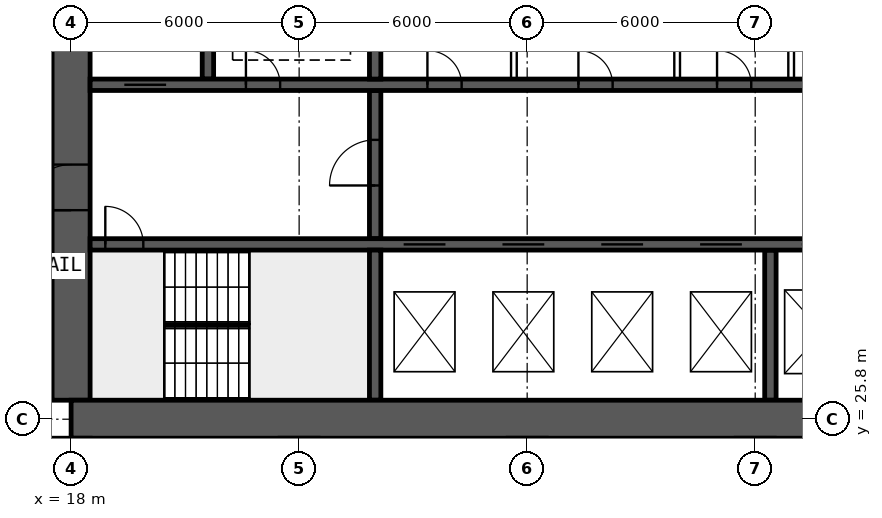
"""IFC4 building model, lengths in metres.
Left out: names, types, materials, properties, quantities, classifications, styles, units other than length and angle.
Written with IfcOpenShell. Run it as: python <this file> out.ifc"""

import sys

from ifc_helpers import new_model, si_unit, direction, frame, frame_2d, origin, place, context, subcontext, project, spatial, rectangle, extrude, element, fill, save


model = new_model("IFC4")
c1 = context("Model", 3, precision=1e-05, world=origin(), true_north=direction((0.0, 1.0)))
c2 = subcontext(c1, "Body", "Model", "MODEL_VIEW")
j1 = project(units=[si_unit("LENGTHUNIT", "METRE"), si_unit("PLANEANGLEUNIT", "RADIAN")], contexts=[c1])
p1 = place(None, origin())
s1 = spatial("IfcSite", under=j1, at=p1, CompositionType="ELEMENT")
p2 = place(p1, origin())
s2 = spatial("IfcBuilding", under=s1, at=p2, CompositionType="ELEMENT")
p3 = place(p2, origin())
s3 = spatial("IfcBuildingStorey", under=s2, at=p3, CompositionType="ELEMENT", Elevation=0.0)
p4 = place(p3, frame((18.0, 25.8, 0.0), z_axis=(0.0, 0.0, 1.0), x_axis=(1.0, 0.0, 0.0)))
e1 = element("IfcWall", 1, at=p4, inside=s3, PredefinedType="SHEAR", context=c2, shape_type="SweptSolid", body=[
    extrude(rectangle(XDim=48.0, YDim=1.0, at=frame_2d((24.0, 0.0))), origin(), (0.0, 0.0, 1.0), 6.0),
])
p5 = place(p3, frame((18.0, 26.3, 0.0), z_axis=(0.0, 0.0, 1.0), x_axis=(0.0, 1.0, 0.0)))
e2 = element("IfcWall", 2, at=p5, inside=s3, PredefinedType="SHEAR", context=c2, shape_type="SweptSolid", body=[
    extrude(rectangle(XDim=11.4, YDim=1.0, at=frame_2d((5.7, 0.0))), origin(), (0.0, 0.0, 1.0), 6.0),
])
p6 = place(p5, frame((5.0, 0.0, 0.0)))
e3 = element("IfcOpeningElement", 3, at=p6, cuts=e2, PredefinedType="OPENING", context=c2, shape_type="SweptSolid", body=[
    extrude(rectangle(XDim=1.2, YDim=2.1, at=frame_2d((0.6, 1.05))), frame((0.0, 0.51, 0.0), z_axis=(0.0, -1.0, 0.0), x_axis=(1.0, 0.0, 0.0)), (0.0, 0.0, 1.0), 1.02),
])
p7 = place(p3, frame((18.5, 30.4, 0.0), z_axis=(0.0, 0.0, 1.0), x_axis=(1.0, 0.0, 0.0)))
e4 = element("IfcWall", 4, at=p7, inside=s3, PredefinedType="SHEAR", context=c2, shape_type="SweptSolid", body=[
    extrude(rectangle(XDim=47.0, YDim=0.3, at=frame_2d((23.5, 0.0))), origin(), (0.0, 0.0, 1.0), 6.0),
])
p8 = place(p7, frame((0.4, 0.0, 0.0)))
e5 = element("IfcOpeningElement", 5, at=p8, cuts=e4, PredefinedType="OPENING", context=c2, shape_type="SweptSolid", body=[
    extrude(rectangle(XDim=1.0, YDim=2.1, at=frame_2d((0.5, 1.05))), frame((0.0, 0.16, 0.0), z_axis=(0.0, -1.0, 0.0), x_axis=(1.0, 0.0, 0.0)), (0.0, 0.0, 1.0), 0.32),
])
p9 = place(p7, frame((45.6, 0.0, 0.0)))
e6 = element("IfcOpeningElement", 6, at=p9, cuts=e4, PredefinedType="OPENING", context=c2, shape_type="SweptSolid", body=[
    extrude(rectangle(XDim=1.0, YDim=2.1, at=frame_2d((0.5, 1.05))), frame((0.0, 0.16, 0.0), z_axis=(0.0, -1.0, 0.0), x_axis=(1.0, 0.0, 0.0)), (0.0, 0.0, 1.0), 0.32),
])
p10 = place(p7, frame((8.25, 0.0, 0.0)))
e7 = element("IfcOpeningElement", 7, at=p10, cuts=e4, PredefinedType="OPENING", context=c2, shape_type="SweptSolid", body=[
    extrude(rectangle(XDim=1.1, YDim=2.1, at=frame_2d((0.55, 1.05))), frame((0.0, 0.16, 0.0), z_axis=(0.0, -1.0, 0.0), x_axis=(1.0, 0.0, 0.0)), (0.0, 0.0, 1.0), 0.32),
])
p11 = place(p7, frame((10.85, 0.0, 0.0)))
e8 = element("IfcOpeningElement", 8, at=p11, cuts=e4, PredefinedType="OPENING", context=c2, shape_type="SweptSolid", body=[
    extrude(rectangle(XDim=1.1, YDim=2.1, at=frame_2d((0.55, 1.05))), frame((0.0, 0.16, 0.0), z_axis=(0.0, -1.0, 0.0), x_axis=(1.0, 0.0, 0.0)), (0.0, 0.0, 1.0), 0.32),
])
p12 = place(p7, frame((13.45, 0.0, 0.0)))
e9 = element("IfcOpeningElement", 9, at=p12, cuts=e4, PredefinedType="OPENING", context=c2, shape_type="SweptSolid", body=[
    extrude(rectangle(XDim=1.1, YDim=2.1, at=frame_2d((0.55, 1.05))), frame((0.0, 0.16, 0.0), z_axis=(0.0, -1.0, 0.0), x_axis=(1.0, 0.0, 0.0)), (0.0, 0.0, 1.0), 0.32),
])
p13 = place(p7, frame((16.05, 0.0, 0.0)))
e10 = element("IfcOpeningElement", 10, at=p13, cuts=e4, PredefinedType="OPENING", context=c2, shape_type="SweptSolid", body=[
    extrude(rectangle(XDim=1.1, YDim=2.1, at=frame_2d((0.55, 1.05))), frame((0.0, 0.16, 0.0), z_axis=(0.0, -1.0, 0.0), x_axis=(1.0, 0.0, 0.0)), (0.0, 0.0, 1.0), 0.32),
])
p14 = place(p7, frame((18.725, 0.0, 0.0)))
e11 = element("IfcOpeningElement", 11, at=p14, cuts=e4, PredefinedType="OPENING", context=c2, shape_type="SweptSolid", body=[
    extrude(rectangle(XDim=1.1, YDim=2.1, at=frame_2d((0.55, 1.05))), frame((0.0, 0.16, 0.0), z_axis=(0.0, -1.0, 0.0), x_axis=(1.0, 0.0, 0.0)), (0.0, 0.0, 1.0), 0.32),
])
p15 = place(p7, frame((21.475, 0.0, 0.0)))
e12 = element("IfcOpeningElement", 12, at=p15, cuts=e4, PredefinedType="OPENING", context=c2, shape_type="SweptSolid", body=[
    extrude(rectangle(XDim=1.1, YDim=2.1, at=frame_2d((0.55, 1.05))), frame((0.0, 0.16, 0.0), z_axis=(0.0, -1.0, 0.0), x_axis=(1.0, 0.0, 0.0)), (0.0, 0.0, 1.0), 0.32),
])
p16 = place(p7, frame((24.225, 0.0, 0.0)))
e13 = element("IfcOpeningElement", 13, at=p16, cuts=e4, PredefinedType="OPENING", context=c2, shape_type="SweptSolid", body=[
    extrude(rectangle(XDim=1.1, YDim=2.1, at=frame_2d((0.55, 1.05))), frame((0.0, 0.16, 0.0), z_axis=(0.0, -1.0, 0.0), x_axis=(1.0, 0.0, 0.0)), (0.0, 0.0, 1.0), 0.32),
])
p17 = place(p7, frame((26.975, 0.0, 0.0)))
e14 = element("IfcOpeningElement", 14, at=p17, cuts=e4, PredefinedType="OPENING", context=c2, shape_type="SweptSolid", body=[
    extrude(rectangle(XDim=1.1, YDim=2.1, at=frame_2d((0.55, 1.05))), frame((0.0, 0.16, 0.0), z_axis=(0.0, -1.0, 0.0), x_axis=(1.0, 0.0, 0.0)), (0.0, 0.0, 1.0), 0.32),
])
p18 = place(p7, frame((30.117, 0.0, 0.0)))
e15 = element("IfcOpeningElement", 15, at=p18, cuts=e4, PredefinedType="OPENING", context=c2, shape_type="SweptSolid", body=[
    extrude(rectangle(XDim=1.1, YDim=2.1, at=frame_2d((0.55, 1.05))), frame((0.0, 0.16, 0.0), z_axis=(0.0, -1.0, 0.0), x_axis=(1.0, 0.0, 0.0)), (0.0, 0.0, 1.0), 0.32),
])
p19 = place(p7, frame((33.65, 0.0, 0.0)))
e16 = element("IfcOpeningElement", 16, at=p19, cuts=e4, PredefinedType="OPENING", context=c2, shape_type="SweptSolid", body=[
    extrude(rectangle(XDim=1.1, YDim=2.1, at=frame_2d((0.55, 1.05))), frame((0.0, 0.16, 0.0), z_axis=(0.0, -1.0, 0.0), x_axis=(1.0, 0.0, 0.0)), (0.0, 0.0, 1.0), 0.32),
])
p20 = place(p7, frame((37.183, 0.0, 0.0)))
e17 = element("IfcOpeningElement", 17, at=p20, cuts=e4, PredefinedType="OPENING", context=c2, shape_type="SweptSolid", body=[
    extrude(rectangle(XDim=1.1, YDim=2.1, at=frame_2d((0.55, 1.05))), frame((0.0, 0.16, 0.0), z_axis=(0.0, -1.0, 0.0), x_axis=(1.0, 0.0, 0.0)), (0.0, 0.0, 1.0), 0.32),
])
p21 = place(p3, frame((18.5, 34.6, 0.0), z_axis=(0.0, 0.0, 1.0), x_axis=(1.0, 0.0, 0.0)))
e18 = element("IfcWall", 18, at=p21, inside=s3, PredefinedType="SHEAR", context=c2, shape_type="SweptSolid", body=[
    extrude(rectangle(XDim=47.0, YDim=0.3, at=frame_2d((23.5, 0.0))), origin(), (0.0, 0.0, 1.0), 6.0),
])
p22 = place(p21, frame((0.9, 0.0, 0.0)))
e19 = element("IfcOpeningElement", 19, at=p22, cuts=e18, PredefinedType="OPENING", context=c2, shape_type="SweptSolid", body=[
    extrude(rectangle(XDim=1.1, YDim=2.1, at=frame_2d((0.55, 1.05))), frame((0.0, 0.16, 0.0), z_axis=(0.0, -1.0, 0.0), x_axis=(1.0, 0.0, 0.0)), (0.0, 0.0, 1.0), 0.32),
])
p23 = place(p21, frame((45.0, 0.0, 0.0)))
e20 = element("IfcOpeningElement", 20, at=p23, cuts=e18, PredefinedType="OPENING", context=c2, shape_type="SweptSolid", body=[
    extrude(rectangle(XDim=1.1, YDim=2.1, at=frame_2d((0.55, 1.05))), frame((0.0, 0.16, 0.0), z_axis=(0.0, -1.0, 0.0), x_axis=(1.0, 0.0, 0.0)), (0.0, 0.0, 1.0), 0.32),
])
p24 = place(p21, frame((4.1, 0.0, 0.0)))
e21 = element("IfcOpeningElement", 21, at=p24, cuts=e18, PredefinedType="OPENING", context=c2, shape_type="SweptSolid", body=[
    extrude(rectangle(XDim=0.9, YDim=2.1, at=frame_2d((0.45, 1.05))), frame((0.0, 0.16, 0.0), z_axis=(0.0, -1.0, 0.0), x_axis=(1.0, 0.0, 0.0)), (0.0, 0.0, 1.0), 0.32),
])
p25 = place(p21, frame((42.0, 0.0, 0.0)))
e22 = element("IfcOpeningElement", 22, at=p25, cuts=e18, PredefinedType="OPENING", context=c2, shape_type="SweptSolid", body=[
    extrude(rectangle(XDim=0.9, YDim=2.1, at=frame_2d((0.45, 1.05))), frame((0.0, 0.16, 0.0), z_axis=(0.0, -1.0, 0.0), x_axis=(1.0, 0.0, 0.0)), (0.0, 0.0, 1.0), 0.32),
])
p26 = place(p21, frame((8.875, 0.0, 0.0)))
e23 = element("IfcOpeningElement", 23, at=p26, cuts=e18, PredefinedType="OPENING", context=c2, shape_type="SweptSolid", body=[
    extrude(rectangle(XDim=0.9, YDim=2.1, at=frame_2d((0.45, 1.05))), frame((0.0, 0.16, 0.0), z_axis=(0.0, -1.0, 0.0), x_axis=(1.0, 0.0, 0.0)), (0.0, 0.0, 1.0), 0.32),
])
p27 = place(p21, frame((12.849, 0.0, 0.0)))
e24 = element("IfcOpeningElement", 24, at=p27, cuts=e18, PredefinedType="OPENING", context=c2, shape_type="SweptSolid", body=[
    extrude(rectangle(XDim=0.9, YDim=2.1, at=frame_2d((0.45, 1.05))), frame((0.0, 0.16, 0.0), z_axis=(0.0, -1.0, 0.0), x_axis=(1.0, 0.0, 0.0)), (0.0, 0.0, 1.0), 0.32),
])
p28 = place(p21, frame((16.496, 0.0, 0.0)))
e25 = element("IfcOpeningElement", 25, at=p28, cuts=e18, PredefinedType="OPENING", context=c2, shape_type="SweptSolid", body=[
    extrude(rectangle(XDim=0.9, YDim=2.1, at=frame_2d((0.45, 1.05))), frame((0.0, 0.16, 0.0), z_axis=(0.0, -1.0, 0.0), x_axis=(1.0, 0.0, 0.0)), (0.0, 0.0, 1.0), 0.32),
])
p29 = place(p21, frame((20.255, 0.0, 0.0)))
e26 = element("IfcOpeningElement", 26, at=p29, cuts=e18, PredefinedType="OPENING", context=c2, shape_type="SweptSolid", body=[
    extrude(rectangle(XDim=0.9, YDim=2.1, at=frame_2d((0.45, 1.05))), frame((0.0, 0.16, 0.0), z_axis=(0.0, -1.0, 0.0), x_axis=(1.0, 0.0, 0.0)), (0.0, 0.0, 1.0), 0.32),
])
p30 = place(p21, frame((24.661, 0.0, 0.0)))
e27 = element("IfcOpeningElement", 27, at=p30, cuts=e18, PredefinedType="OPENING", context=c2, shape_type="SweptSolid", body=[
    extrude(rectangle(XDim=0.9, YDim=2.1, at=frame_2d((0.45, 1.05))), frame((0.0, 0.16, 0.0), z_axis=(0.0, -1.0, 0.0), x_axis=(1.0, 0.0, 0.0)), (0.0, 0.0, 1.0), 0.32),
])
p31 = place(p21, frame((27.458, 0.0, 0.0)))
e28 = element("IfcOpeningElement", 28, at=p31, cuts=e18, PredefinedType="OPENING", context=c2, shape_type="SweptSolid", body=[
    extrude(rectangle(XDim=0.9, YDim=2.1, at=frame_2d((0.45, 1.05))), frame((0.0, 0.16, 0.0), z_axis=(0.0, -1.0, 0.0), x_axis=(1.0, 0.0, 0.0)), (0.0, 0.0, 1.0), 0.32),
])
p32 = place(p21, frame((29.628, 0.0, 0.0)))
e29 = element("IfcOpeningElement", 29, at=p32, cuts=e18, PredefinedType="OPENING", context=c2, shape_type="SweptSolid", body=[
    extrude(rectangle(XDim=0.9, YDim=2.1, at=frame_2d((0.45, 1.05))), frame((0.0, 0.16, 0.0), z_axis=(0.0, -1.0, 0.0), x_axis=(1.0, 0.0, 0.0)), (0.0, 0.0, 1.0), 0.32),
])
p33 = place(p21, frame((33.427, 0.0, 0.0)))
e30 = element("IfcOpeningElement", 30, at=p33, cuts=e18, PredefinedType="OPENING", context=c2, shape_type="SweptSolid", body=[
    extrude(rectangle(XDim=0.9, YDim=2.1, at=frame_2d((0.45, 1.05))), frame((0.0, 0.16, 0.0), z_axis=(0.0, -1.0, 0.0), x_axis=(1.0, 0.0, 0.0)), (0.0, 0.0, 1.0), 0.32),
])
p34 = place(p21, frame((37.378, 0.0, 0.0)))
e31 = element("IfcOpeningElement", 31, at=p34, cuts=e18, PredefinedType="OPENING", context=c2, shape_type="SweptSolid", body=[
    extrude(rectangle(XDim=0.9, YDim=2.1, at=frame_2d((0.45, 1.05))), frame((0.0, 0.16, 0.0), z_axis=(0.0, -1.0, 0.0), x_axis=(1.0, 0.0, 0.0)), (0.0, 0.0, 1.0), 0.32),
])
p35 = place(p3, frame((26.0, 26.3, 0.0), z_axis=(0.0, 0.0, 1.0), x_axis=(0.0, 1.0, 0.0)))
e32 = element("IfcWall", 32, at=p35, inside=s3, PredefinedType="SHEAR", context=c2, shape_type="SweptSolid", body=[
    extrude(rectangle(XDim=3.95, YDim=0.3, at=frame_2d((1.975, 0.0))), origin(), (0.0, 0.0, 1.0), 6.0),
])
p36 = place(p3, frame((26.0, 30.55, 0.0), z_axis=(0.0, 0.0, 1.0), x_axis=(0.0, 1.0, 0.0)))
e33 = element("IfcWall", 33, at=p36, inside=s3, PredefinedType="SHEAR", context=c2, shape_type="SweptSolid", body=[
    extrude(rectangle(XDim=3.9, YDim=0.3, at=frame_2d((1.95, 0.0))), origin(), (0.0, 0.0, 1.0), 6.0),
])
p37 = place(p36, frame((1.4, 0.0, 0.0)))
e34 = element("IfcOpeningElement", 34, at=p37, cuts=e33, PredefinedType="OPENING", context=c2, shape_type="SweptSolid", body=[
    extrude(rectangle(XDim=1.2, YDim=2.1, at=frame_2d((0.6, 1.05))), frame((0.0, 0.16, 0.0), z_axis=(0.0, -1.0, 0.0), x_axis=(1.0, 0.0, 0.0)), (0.0, 0.0, 1.0), 0.32),
])
for number, where, z_axis, x_axis in (
    (35, (21.6, 34.75, 0.0), (0.0, 0.0, 1.0), (0.0, 1.0, 0.0)),
    (36, (26.0, 34.75, 0.0), (0.0, 0.0, 1.0), (0.0, 1.0, 0.0)),
):
    element("IfcWall", number, at=place(p3, frame(where, z_axis=z_axis, x_axis=x_axis)), inside=s3, PredefinedType="SHEAR", context=c2, shape_type="SweptSolid", body=[
        extrude(rectangle(XDim=2.95, YDim=0.3, at=frame_2d((1.475, 0.0))), origin(), (0.0, 0.0, 1.0), 6.0),
    ])
p38 = place(p3, frame((36.4, 26.3, 0.0), z_axis=(0.0, 0.0, 1.0), x_axis=(0.0, 1.0, 0.0)))
e37 = element("IfcWall", 37, at=p38, inside=s3, PredefinedType="SHEAR", context=c2, shape_type="SweptSolid", body=[
    extrude(rectangle(XDim=3.95, YDim=0.3, at=frame_2d((1.975, 0.0))), origin(), (0.0, 0.0, 1.0), 6.0),
])
for number, where, z_axis, x_axis in (
    (38, (29.651, 34.75, 0.0), (0.0, 0.0, 1.0), (0.0, 1.0, 0.0)),
    (39, (33.946, 34.75, 0.0), (0.0, 0.0, 1.0), (0.0, 1.0, 0.0)),
    (40, (36.946, 34.75, 0.0), (0.0, 0.0, 1.0), (0.0, 1.0, 0.0)),
):
    element("IfcWall", number, at=place(p3, frame(where, z_axis=z_axis, x_axis=x_axis)), inside=s3, PredefinedType="SOLIDWALL", context=c2, shape_type="SweptSolid", body=[
        extrude(rectangle(XDim=2.95, YDim=0.15, at=frame_2d((1.475, 0.0))), origin(), (0.0, 0.0, 1.0), 5.65),
    ])
p39 = place(p3, frame((22.05, 14.8, 0.0), z_axis=(0.0, 0.0, 1.0), x_axis=(0.0, 1.0, 0.0)))
e41 = element("IfcWall", 41, at=p39, inside=s3, PredefinedType="PARTITIONING", context=c2, shape_type="SweptSolid", body=[
    extrude(rectangle(XDim=10.7, YDim=0.15, at=frame_2d((5.35, 0.0))), origin(), (0.0, 0.0, 1.0), 5.65),
])
p40 = place(p39, frame((1.0, 0.0, 0.0)))
e42 = element("IfcOpeningElement", 42, at=p40, cuts=e41, PredefinedType="OPENING", context=c2, shape_type="SweptSolid", body=[
    extrude(rectangle(XDim=0.9, YDim=2.1, at=frame_2d((0.45, 1.05))), frame((0.0, 0.085, 0.0), z_axis=(0.0, -1.0, 0.0), x_axis=(1.0, 0.0, 0.0)), (0.0, 0.0, 1.0), 0.17),
])
p41 = place(p3, frame((26.925, 14.8, 0.0), z_axis=(0.0, 0.0, 1.0), x_axis=(0.0, 1.0, 0.0)))
e43 = element("IfcWall", 43, at=p41, inside=s3, PredefinedType="PARTITIONING", context=c2, shape_type="SweptSolid", body=[
    extrude(rectangle(XDim=10.7, YDim=0.15, at=frame_2d((5.35, 0.0))), origin(), (0.0, 0.0, 1.0), 5.65),
])
p42 = place(p41, frame((1.0, 0.0, 0.0)))
e44 = element("IfcOpeningElement", 44, at=p42, cuts=e43, PredefinedType="OPENING", context=c2, shape_type="SweptSolid", body=[
    extrude(rectangle(XDim=0.9, YDim=2.1, at=frame_2d((0.45, 1.05))), frame((0.0, 0.085, 0.0), z_axis=(0.0, -1.0, 0.0), x_axis=(1.0, 0.0, 0.0)), (0.0, 0.0, 1.0), 0.17),
])
p43 = place(p6, origin())
e45 = element("IfcDoor", 45, at=p43, inside=s3, OperationType="SINGLE_SWING_LEFT", PredefinedType="DOOR", context=c2, shape_type="SweptSolid", body=[
    extrude(rectangle(XDim=1.2, YDim=2.1, at=frame_2d((0.6, 1.05))), frame((0.0, 0.025, 0.0), z_axis=(0.0, -1.0, 0.0), x_axis=(1.0, 0.0, 0.0)), (0.0, 0.0, 1.0), 0.05),
])
fill(e3, e45)
p44 = place(p8, origin())
e46 = element("IfcDoor", 46, at=p44, inside=s3, OperationType="SINGLE_SWING_LEFT", PredefinedType="DOOR", context=c2, shape_type="SweptSolid", body=[
    extrude(rectangle(XDim=1.0, YDim=2.1, at=frame_2d((0.5, 1.05))), frame((0.0, 0.025, 0.0), z_axis=(0.0, -1.0, 0.0), x_axis=(1.0, 0.0, 0.0)), (0.0, 0.0, 1.0), 0.05),
])
fill(e5, e46)
p45 = place(p22, origin())
e47 = element("IfcDoor", 47, at=p45, inside=s3, OperationType="DOUBLE_DOOR_SLIDING", PredefinedType="DOOR", context=c2, shape_type="SweptSolid", body=[
    extrude(rectangle(XDim=1.1, YDim=2.1, at=frame_2d((0.55, 1.05))), frame((0.0, 0.025, 0.0), z_axis=(0.0, -1.0, 0.0), x_axis=(1.0, 0.0, 0.0)), (0.0, 0.0, 1.0), 0.05),
])
fill(e19, e47)
p46 = place(p24, origin())
e48 = element("IfcDoor", 48, at=p46, inside=s3, OperationType="SINGLE_SWING_LEFT", PredefinedType="DOOR", context=c2, shape_type="SweptSolid", body=[
    extrude(rectangle(XDim=0.9, YDim=2.1, at=frame_2d((0.45, 1.05))), frame((0.0, 0.025, 0.0), z_axis=(0.0, -1.0, 0.0), x_axis=(1.0, 0.0, 0.0)), (0.0, 0.0, 1.0), 0.05),
])
fill(e21, e48)
p47 = place(p37, origin())
e49 = element("IfcDoor", 49, at=p47, inside=s3, OperationType="SINGLE_SWING_LEFT", PredefinedType="DOOR", context=c2, shape_type="SweptSolid", body=[
    extrude(rectangle(XDim=1.2, YDim=2.1, at=frame_2d((0.6, 1.05))), frame((0.0, 0.025, 0.0), z_axis=(0.0, -1.0, 0.0), x_axis=(1.0, 0.0, 0.0)), (0.0, 0.0, 1.0), 0.05),
])
fill(e34, e49)
p48 = place(p26, origin())
e50 = element("IfcDoor", 50, at=p48, inside=s3, OperationType="SINGLE_SWING_LEFT", PredefinedType="DOOR", context=c2, shape_type="SweptSolid", body=[
    extrude(rectangle(XDim=0.9, YDim=2.1, at=frame_2d((0.45, 1.05))), frame((0.0, 0.025, 0.0), z_axis=(0.0, -1.0, 0.0), x_axis=(1.0, 0.0, 0.0)), (0.0, 0.0, 1.0), 0.05),
])
fill(e23, e50)
p49 = place(p27, origin())
e51 = element("IfcDoor", 51, at=p49, inside=s3, OperationType="SINGLE_SWING_LEFT", PredefinedType="DOOR", context=c2, shape_type="SweptSolid", body=[
    extrude(rectangle(XDim=0.9, YDim=2.1, at=frame_2d((0.45, 1.05))), frame((0.0, 0.025, 0.0), z_axis=(0.0, -1.0, 0.0), x_axis=(1.0, 0.0, 0.0)), (0.0, 0.0, 1.0), 0.05),
])
fill(e24, e51)
p50 = place(p28, origin())
e52 = element("IfcDoor", 52, at=p50, inside=s3, OperationType="SINGLE_SWING_LEFT", PredefinedType="DOOR", context=c2, shape_type="SweptSolid", body=[
    extrude(rectangle(XDim=0.9, YDim=2.1, at=frame_2d((0.45, 1.05))), frame((0.0, 0.025, 0.0), z_axis=(0.0, -1.0, 0.0), x_axis=(1.0, 0.0, 0.0)), (0.0, 0.0, 1.0), 0.05),
])
fill(e25, e52)
p51 = place(p10, origin())
e53 = element("IfcDoor", 53, at=p51, inside=s3, OperationType="DOUBLE_DOOR_SLIDING", PredefinedType="DOOR", context=c2, shape_type="SweptSolid", body=[
    extrude(rectangle(XDim=1.1, YDim=2.1, at=frame_2d((0.55, 1.05))), frame((0.0, 0.025, 0.0), z_axis=(0.0, -1.0, 0.0), x_axis=(1.0, 0.0, 0.0)), (0.0, 0.0, 1.0), 0.05),
])
fill(e7, e53)
p52 = place(p11, origin())
e54 = element("IfcDoor", 54, at=p52, inside=s3, OperationType="DOUBLE_DOOR_SLIDING", PredefinedType="DOOR", context=c2, shape_type="SweptSolid", body=[
    extrude(rectangle(XDim=1.1, YDim=2.1, at=frame_2d((0.55, 1.05))), frame((0.0, 0.025, 0.0), z_axis=(0.0, -1.0, 0.0), x_axis=(1.0, 0.0, 0.0)), (0.0, 0.0, 1.0), 0.05),
])
fill(e8, e54)
p53 = place(p12, origin())
e55 = element("IfcDoor", 55, at=p53, inside=s3, OperationType="DOUBLE_DOOR_SLIDING", PredefinedType="DOOR", context=c2, shape_type="SweptSolid", body=[
    extrude(rectangle(XDim=1.1, YDim=2.1, at=frame_2d((0.55, 1.05))), frame((0.0, 0.025, 0.0), z_axis=(0.0, -1.0, 0.0), x_axis=(1.0, 0.0, 0.0)), (0.0, 0.0, 1.0), 0.05),
])
fill(e9, e55)
p54 = place(p13, origin())
e56 = element("IfcDoor", 56, at=p54, inside=s3, OperationType="DOUBLE_DOOR_SLIDING", PredefinedType="DOOR", context=c2, shape_type="SweptSolid", body=[
    extrude(rectangle(XDim=1.1, YDim=2.1, at=frame_2d((0.55, 1.05))), frame((0.0, 0.025, 0.0), z_axis=(0.0, -1.0, 0.0), x_axis=(1.0, 0.0, 0.0)), (0.0, 0.0, 1.0), 0.05),
])
fill(e10, e56)
p55 = place(p14, origin())
e57 = element("IfcDoor", 57, at=p55, inside=s3, OperationType="DOUBLE_DOOR_SLIDING", PredefinedType="DOOR", context=c2, shape_type="SweptSolid", body=[
    extrude(rectangle(XDim=1.1, YDim=2.1, at=frame_2d((0.55, 1.05))), frame((0.0, 0.025, 0.0), z_axis=(0.0, -1.0, 0.0), x_axis=(1.0, 0.0, 0.0)), (0.0, 0.0, 1.0), 0.05),
])
fill(e11, e57)
save(model, sys.argv[1])
